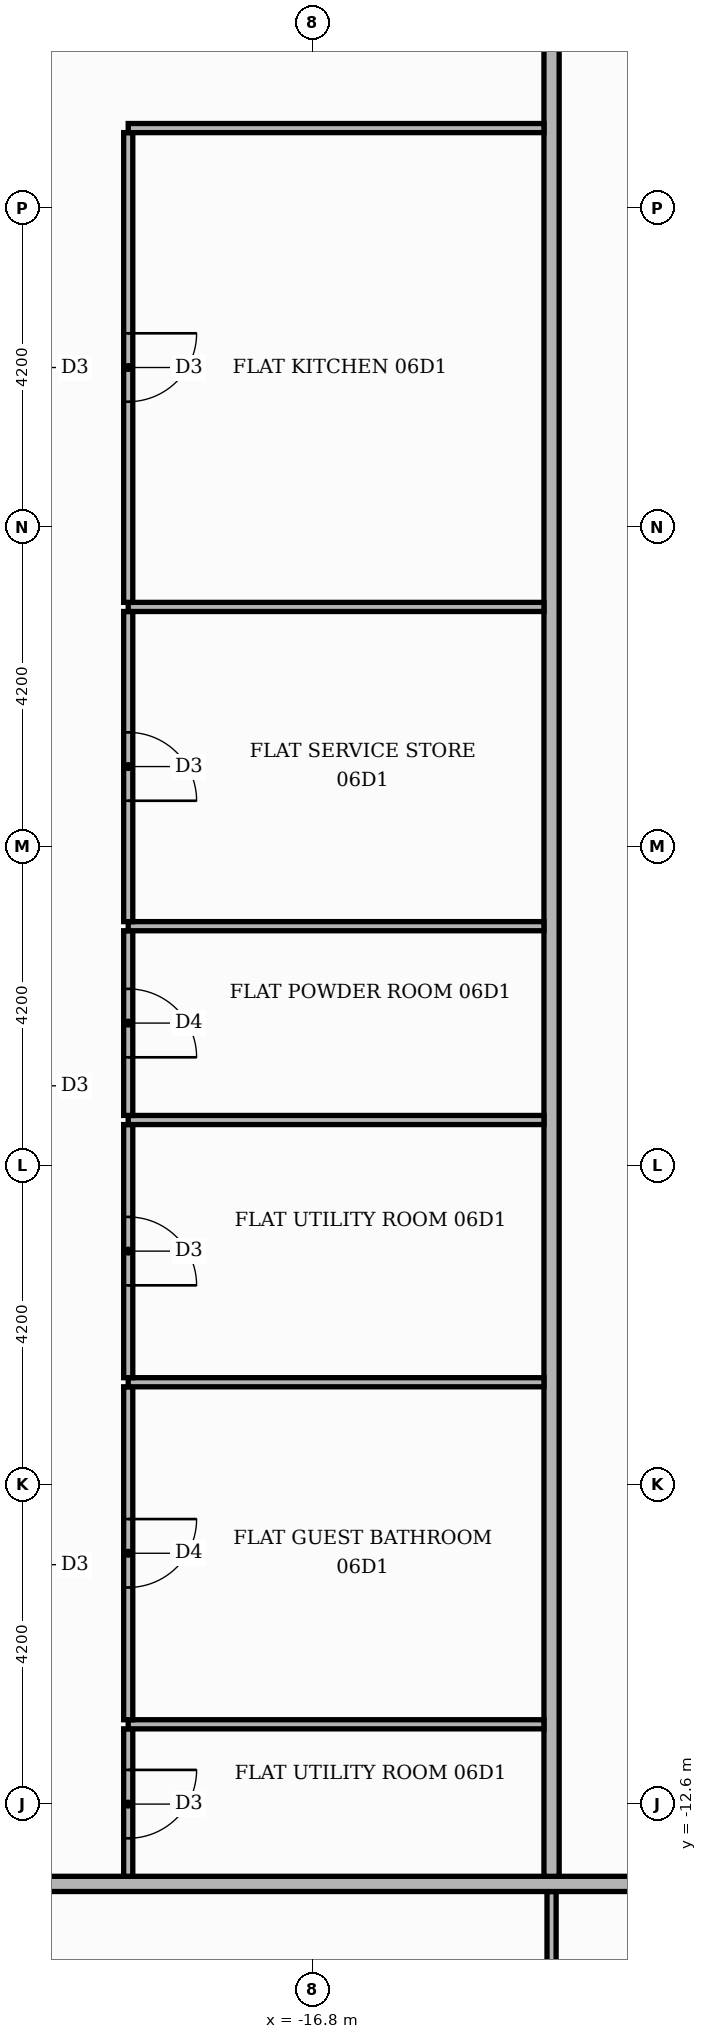
"""IFC4 building model, lengths in metres.
Left out: names, types, materials, properties, quantities, classifications, styles, units other than length and angle.
Written with IfcOpenShell. Run it as: python <this file> out.ifc"""

import sys

from ifc_helpers import new_model, si_unit, direction, frame, frame_2d, origin, place, context, subcontext, project, spatial, rectangle, extrude, element, fill, save


model = new_model("IFC4")
c1 = context("Model", 3, precision=1e-05, world=origin(), true_north=direction((0.0, 1.0)))
c2 = subcontext(c1, "Body", "Model", "MODEL_VIEW")
j1 = project(units=[si_unit("LENGTHUNIT", "METRE"), si_unit("PLANEANGLEUNIT", "RADIAN")], contexts=[c1])
p1 = place(None, origin())
s1 = spatial("IfcSite", under=j1, at=p1, CompositionType="ELEMENT")
p2 = place(p1, origin())
s2 = spatial("IfcBuilding", under=s1, at=p2, CompositionType="ELEMENT")
p3 = place(p2, frame((0.0, 0.0, 30.9)))
s3 = spatial("IfcBuildingStorey", under=s2, at=p3, CompositionType="ELEMENT", Elevation=30.9)
p4 = place(p3, frame((-13.65, -20.06, 0.0), z_axis=(0.0, 0.0, 1.0), x_axis=(0.0, 1.0, 0.0)))
e1 = element("IfcWall", 1, at=p4, inside=s3, PredefinedType="PARTITIONING", context=c2, shape_type="SweptSolid", body=[
    extrude(rectangle(XDim=6.31, YDim=0.12, at=frame_2d((3.155, 0.0))), origin(), (0.0, 0.0, 1.0), 3.48),
])
p5 = place(p4, frame((2.675, 0.0, 0.0)))
e2 = element("IfcOpeningElement", 2, at=p5, cuts=e1, PredefinedType="OPENING", context=c2, shape_type="SweptSolid", body=[
    extrude(rectangle(XDim=1.0, YDim=2.1, at=frame_2d((0.5, 1.05))), frame((0.0, 0.07, 0.0), z_axis=(0.0, -1.0, 0.0), x_axis=(1.0, 0.0, 0.0)), (0.0, 0.0, 1.0), 0.14),
])
p6 = place(p3, frame((-25.42, -13.65, 0.0), z_axis=(0.0, 0.0, 1.0), x_axis=(1.0, 0.0, 0.0)))
e3 = element("IfcWall", 3, at=p6, inside=s3, PredefinedType="PARTITIONING", context=c2, shape_type="SweptSolid", body=[
    extrude(rectangle(XDim=39.07, YDim=0.2, at=frame_2d((19.535, 0.0))), origin(), (0.0, 0.0, 1.0), 3.48),
])
p7 = place(p6, frame((14.37, 0.0, 0.0)))
e4 = element("IfcOpeningElement", 4, at=p7, cuts=e3, PredefinedType="OPENING", context=c2, shape_type="SweptSolid", body=[
    extrude(rectangle(XDim=1.1, YDim=2.4, at=frame_2d((0.55, 1.2))), frame((0.0, 0.11, 0.0), z_axis=(0.0, -1.0, 0.0), x_axis=(1.0, 0.0, 0.0)), (0.0, 0.0, 1.0), 0.22),
])
p8 = place(p3, frame((-19.22, -13.55, 0.0), z_axis=(0.0, 0.0, 1.0), x_axis=(0.0, 1.0, 0.0)))
e5 = element("IfcWall", 5, at=p8, inside=s3, PredefinedType="PARTITIONING", context=c2, shape_type="SweptSolid", body=[
    extrude(rectangle(XDim=1.94, YDim=0.12, at=frame_2d((0.97, 0.0))), origin(), (0.0, 0.0, 1.0), 3.48),
])
p9 = place(p8, frame((0.5, 0.0, 0.0)))
e6 = element("IfcOpeningElement", 6, at=p9, cuts=e5, PredefinedType="OPENING", context=c2, shape_type="SweptSolid", body=[
    extrude(rectangle(XDim=0.9, YDim=2.1, at=frame_2d((0.45, 1.05))), frame((0.0, 0.07, 0.0), z_axis=(0.0, -1.0, 0.0), x_axis=(1.0, 0.0, 0.0)), (0.0, 0.0, 1.0), 0.14),
])
p10 = place(p3, frame((-13.65, -13.55, 0.0), z_axis=(0.0, 0.0, 1.0), x_axis=(0.0, 1.0, 0.0)))
e7 = element("IfcWall", 7, at=p10, inside=s3, PredefinedType="PARTITIONING", context=c2, shape_type="SweptSolid", body=[
    extrude(rectangle(XDim=27.1, YDim=0.2, at=frame_2d((13.55, 0.0))), origin(), (0.0, 0.0, 1.0), 3.48),
])
p11 = place(p10, frame((24.55, 0.0, 0.0)))
e8 = element("IfcOpeningElement", 8, at=p11, cuts=e7, PredefinedType="OPENING", context=c2, shape_type="SweptSolid", body=[
    extrude(rectangle(XDim=1.1, YDim=2.4, at=frame_2d((0.55, 1.2))), frame((0.0, 0.11, 0.0), z_axis=(0.0, -1.0, 0.0), x_axis=(1.0, 0.0, 0.0)), (0.0, 0.0, 1.0), 0.22),
])
p12 = place(p3, frame((-19.22, -11.55, 0.0), z_axis=(0.0, 0.0, 1.0), x_axis=(1.0, 0.0, 0.0)))
e9 = element("IfcWall", 9, at=p12, inside=s3, PredefinedType="PARTITIONING", context=c2, shape_type="SweptSolid", body=[
    extrude(rectangle(XDim=5.47, YDim=0.12, at=frame_2d((2.735, 0.0))), origin(), (0.0, 0.0, 1.0), 3.48),
])
p13 = place(p3, frame((-19.22, -11.49, 0.0), z_axis=(0.0, 0.0, 1.0), x_axis=(0.0, 1.0, 0.0)))
e10 = element("IfcWall", 10, at=p13, inside=s3, PredefinedType="PARTITIONING", context=c2, shape_type="SweptSolid", body=[
    extrude(rectangle(XDim=4.38, YDim=0.12, at=frame_2d((2.19, 0.0))), origin(), (0.0, 0.0, 1.0), 3.48),
])
p14 = place(p13, frame((1.74, 0.0, 0.0)))
e11 = element("IfcOpeningElement", 11, at=p14, cuts=e10, PredefinedType="OPENING", context=c2, shape_type="SweptSolid", body=[
    extrude(rectangle(XDim=0.9, YDim=2.1, at=frame_2d((0.45, 1.05))), frame((0.0, 0.07, 0.0), z_axis=(0.0, -1.0, 0.0), x_axis=(1.0, 0.0, 0.0)), (0.0, 0.0, 1.0), 0.14),
])
p15 = place(p3, frame((-19.22, -7.05, 0.0), z_axis=(0.0, 0.0, 1.0), x_axis=(1.0, 0.0, 0.0)))
e12 = element("IfcWall", 12, at=p15, inside=s3, PredefinedType="PARTITIONING", context=c2, shape_type="SweptSolid", body=[
    extrude(rectangle(XDim=5.47, YDim=0.12, at=frame_2d((2.735, 0.0))), origin(), (0.0, 0.0, 1.0), 3.48),
])
p16 = place(p3, frame((-19.22, -6.99, 0.0), z_axis=(0.0, 0.0, 1.0), x_axis=(0.0, 1.0, 0.0)))
e13 = element("IfcWall", 13, at=p16, inside=s3, PredefinedType="PARTITIONING", context=c2, shape_type="SweptSolid", body=[
    extrude(rectangle(XDim=3.33, YDim=0.12, at=frame_2d((1.665, 0.0))), origin(), (0.0, 0.0, 1.0), 3.48),
])
p17 = place(p16, frame((1.215, 0.0, 0.0)))
e14 = element("IfcOpeningElement", 14, at=p17, cuts=e13, PredefinedType="OPENING", context=c2, shape_type="SweptSolid", body=[
    extrude(rectangle(XDim=0.9, YDim=2.1, at=frame_2d((0.45, 1.05))), frame((0.0, 0.07, 0.0), z_axis=(0.0, -1.0, 0.0), x_axis=(1.0, 0.0, 0.0)), (0.0, 0.0, 1.0), 0.14),
])
p18 = place(p3, frame((-19.22, -3.6, 0.0), z_axis=(0.0, 0.0, 1.0), x_axis=(1.0, 0.0, 0.0)))
e15 = element("IfcWall", 15, at=p18, inside=s3, PredefinedType="PARTITIONING", context=c2, shape_type="SweptSolid", body=[
    extrude(rectangle(XDim=5.47, YDim=0.12, at=frame_2d((2.735, 0.0))), origin(), (0.0, 0.0, 1.0), 3.48),
])
p19 = place(p3, frame((-19.22, -3.54, 0.0), z_axis=(0.0, 0.0, 1.0), x_axis=(0.0, 1.0, 0.0)))
e16 = element("IfcWall", 16, at=p19, inside=s3, PredefinedType="PARTITIONING", context=c2, shape_type="SweptSolid", body=[
    extrude(rectangle(XDim=2.43, YDim=0.12, at=frame_2d((1.215, 0.0))), origin(), (0.0, 0.0, 1.0), 3.48),
])
p20 = place(p19, frame((0.765, 0.0, 0.0)))
e17 = element("IfcOpeningElement", 17, at=p20, cuts=e16, PredefinedType="OPENING", context=c2, shape_type="SweptSolid", body=[
    extrude(rectangle(XDim=0.9, YDim=2.1, at=frame_2d((0.45, 1.05))), frame((0.0, 0.07, 0.0), z_axis=(0.0, -1.0, 0.0), x_axis=(1.0, 0.0, 0.0)), (0.0, 0.0, 1.0), 0.14),
])
p21 = place(p3, frame((-19.22, -1.05, 0.0), z_axis=(0.0, 0.0, 1.0), x_axis=(1.0, 0.0, 0.0)))
e18 = element("IfcWall", 18, at=p21, inside=s3, PredefinedType="PARTITIONING", context=c2, shape_type="SweptSolid", body=[
    extrude(rectangle(XDim=5.47, YDim=0.12, at=frame_2d((2.735, 0.0))), origin(), (0.0, 0.0, 1.0), 3.48),
])
p22 = place(p3, frame((-19.22, -0.99, 0.0), z_axis=(0.0, 0.0, 1.0), x_axis=(0.0, 1.0, 0.0)))
e19 = element("IfcWall", 19, at=p22, inside=s3, PredefinedType="PARTITIONING", context=c2, shape_type="SweptSolid", body=[
    extrude(rectangle(XDim=4.08, YDim=0.12, at=frame_2d((2.04, 0.0))), origin(), (0.0, 0.0, 1.0), 3.48),
])
p23 = place(p22, frame((1.59, 0.0, 0.0)))
e20 = element("IfcOpeningElement", 20, at=p23, cuts=e19, PredefinedType="OPENING", context=c2, shape_type="SweptSolid", body=[
    extrude(rectangle(XDim=0.9, YDim=2.1, at=frame_2d((0.45, 1.05))), frame((0.0, 0.07, 0.0), z_axis=(0.0, -1.0, 0.0), x_axis=(1.0, 0.0, 0.0)), (0.0, 0.0, 1.0), 0.14),
])
p24 = place(p3, frame((-19.22, 3.15, 0.0), z_axis=(0.0, 0.0, 1.0), x_axis=(1.0, 0.0, 0.0)))
e21 = element("IfcWall", 21, at=p24, inside=s3, PredefinedType="PARTITIONING", context=c2, shape_type="SweptSolid", body=[
    extrude(rectangle(XDim=5.47, YDim=0.12, at=frame_2d((2.735, 0.0))), origin(), (0.0, 0.0, 1.0), 3.48),
])
p25 = place(p3, frame((-19.22, 3.21, 0.0), z_axis=(0.0, 0.0, 1.0), x_axis=(0.0, 1.0, 0.0)))
e22 = element("IfcWall", 22, at=p25, inside=s3, PredefinedType="PARTITIONING", context=c2, shape_type="SweptSolid", body=[
    extrude(rectangle(XDim=6.18, YDim=0.12, at=frame_2d((3.09, 0.0))), origin(), (0.0, 0.0, 1.0), 3.48),
])
p26 = place(p25, frame((2.64, 0.0, 0.0)))
e23 = element("IfcOpeningElement", 23, at=p26, cuts=e22, PredefinedType="OPENING", context=c2, shape_type="SweptSolid", body=[
    extrude(rectangle(XDim=0.9, YDim=2.1, at=frame_2d((0.45, 1.05))), frame((0.0, 0.07, 0.0), z_axis=(0.0, -1.0, 0.0), x_axis=(1.0, 0.0, 0.0)), (0.0, 0.0, 1.0), 0.14),
])
p27 = place(p3, frame((-19.22, 9.45, 0.0), z_axis=(0.0, 0.0, 1.0), x_axis=(1.0, 0.0, 0.0)))
e24 = element("IfcWall", 24, at=p27, inside=s3, PredefinedType="PARTITIONING", context=c2, shape_type="SweptSolid", body=[
    extrude(rectangle(XDim=5.47, YDim=0.12, at=frame_2d((2.735, 0.0))), origin(), (0.0, 0.0, 1.0), 3.48),
])
p28 = place(p26, frame((0.9, 0.0, 0.0), z_axis=(0.0, 0.0, 1.0), x_axis=(-1.0, 0.0, 0.0)))
e25 = element("IfcDoor", 25, at=p28, inside=s3, OperationType="SINGLE_SWING_RIGHT", PredefinedType="DOOR", context=c2, shape_type="SweptSolid", body=[
    extrude(rectangle(XDim=0.9, YDim=2.1, at=frame_2d((0.45, 1.05))), frame((0.0, 0.025, 0.0), z_axis=(0.0, -1.0, 0.0), x_axis=(1.0, 0.0, 0.0)), (0.0, 0.0, 1.0), 0.05),
])
fill(e23, e25)
p29 = place(p23, frame((0.9, 0.0, 0.0), z_axis=(0.0, 0.0, 1.0), x_axis=(-1.0, 0.0, 0.0)))
e26 = element("IfcDoor", 26, at=p29, inside=s3, OperationType="SINGLE_SWING_LEFT", PredefinedType="DOOR", context=c2, shape_type="SweptSolid", body=[
    extrude(rectangle(XDim=0.9, YDim=2.1, at=frame_2d((0.45, 1.05))), frame((0.0, 0.025, 0.0), z_axis=(0.0, -1.0, 0.0), x_axis=(1.0, 0.0, 0.0)), (0.0, 0.0, 1.0), 0.05),
])
fill(e20, e26)
p30 = place(p20, frame((0.9, 0.0, 0.0), z_axis=(0.0, 0.0, 1.0), x_axis=(-1.0, 0.0, 0.0)))
e27 = element("IfcDoor", 27, at=p30, inside=s3, OperationType="SINGLE_SWING_LEFT", PredefinedType="DOOR", context=c2, shape_type="SweptSolid", body=[
    extrude(rectangle(XDim=0.9, YDim=2.1, at=frame_2d((0.45, 1.05))), frame((0.0, 0.025, 0.0), z_axis=(0.0, -1.0, 0.0), x_axis=(1.0, 0.0, 0.0)), (0.0, 0.0, 1.0), 0.05),
])
fill(e17, e27)
p31 = place(p17, frame((0.9, 0.0, 0.0), z_axis=(0.0, 0.0, 1.0), x_axis=(-1.0, 0.0, 0.0)))
e28 = element("IfcDoor", 28, at=p31, inside=s3, OperationType="SINGLE_SWING_LEFT", PredefinedType="DOOR", context=c2, shape_type="SweptSolid", body=[
    extrude(rectangle(XDim=0.9, YDim=2.1, at=frame_2d((0.45, 1.05))), frame((0.0, 0.025, 0.0), z_axis=(0.0, -1.0, 0.0), x_axis=(1.0, 0.0, 0.0)), (0.0, 0.0, 1.0), 0.05),
])
fill(e14, e28)
p32 = place(p14, frame((0.9, 0.0, 0.0), z_axis=(0.0, 0.0, 1.0), x_axis=(-1.0, 0.0, 0.0)))
e29 = element("IfcDoor", 29, at=p32, inside=s3, OperationType="SINGLE_SWING_RIGHT", PredefinedType="DOOR", context=c2, shape_type="SweptSolid", body=[
    extrude(rectangle(XDim=0.9, YDim=2.1, at=frame_2d((0.45, 1.05))), frame((0.0, 0.025, 0.0), z_axis=(0.0, -1.0, 0.0), x_axis=(1.0, 0.0, 0.0)), (0.0, 0.0, 1.0), 0.05),
])
fill(e11, e29)
p33 = place(p9, frame((0.9, 0.0, 0.0), z_axis=(0.0, 0.0, 1.0), x_axis=(-1.0, 0.0, 0.0)))
e30 = element("IfcDoor", 30, at=p33, inside=s3, OperationType="SINGLE_SWING_RIGHT", PredefinedType="DOOR", context=c2, shape_type="SweptSolid", body=[
    extrude(rectangle(XDim=0.9, YDim=2.1, at=frame_2d((0.45, 1.05))), frame((0.0, 0.025, 0.0), z_axis=(0.0, -1.0, 0.0), x_axis=(1.0, 0.0, 0.0)), (0.0, 0.0, 1.0), 0.05),
])
fill(e6, e30)
save(model, sys.argv[1])
